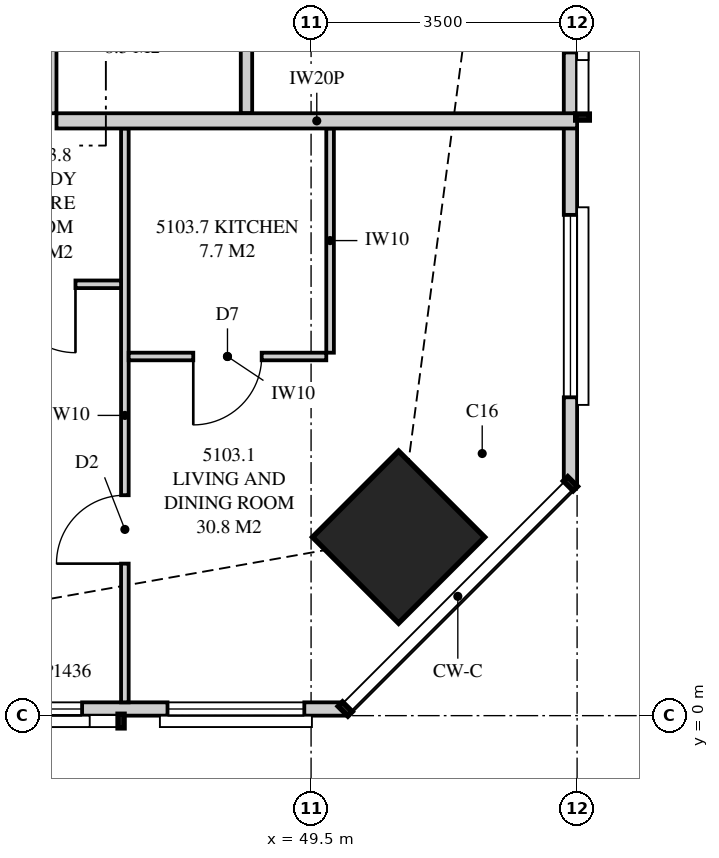
"""IFC4 building model, lengths in metres.
Left out: names, types, materials, properties, quantities, classifications, styles, units other than length and angle.
Written with IfcOpenShell. Run it as: python <this file> out.ifc"""

import sys

from ifc_helpers import new_model, si_unit, direction, frame, frame_2d, origin, origin_2d, place, context, subcontext, project, spatial, polyline, rectangle, outline, extrude, element, fill, save


model = new_model("IFC4")
c1 = context("Model", 3, precision=1e-05, world=origin(), true_north=direction((0.0, 1.0)))
c2 = subcontext(c1, "Body", "Model", "MODEL_VIEW")
j1 = project(units=[si_unit("LENGTHUNIT", "METRE"), si_unit("PLANEANGLEUNIT", "RADIAN")], contexts=[c1])
p1 = place(None, origin())
s1 = spatial("IfcSite", under=j1, at=p1, CompositionType="ELEMENT")
p2 = place(p1, origin())
s2 = spatial("IfcBuilding", under=s1, at=p2, CompositionType="ELEMENT")
p3 = place(p2, frame((0.0, 0.0, 187.85)))
s3 = spatial("IfcBuildingStorey", under=s2, at=p3, CompositionType="ELEMENT", Elevation=187.85)
p4 = place(p3, frame((50.652, 2.348, 0.0), z_axis=(0.0, 0.0, 1.0), x_axis=(0.707106781187, 0.707106781187, 0.0)))
e1 = element("IfcColumn", 1, at=p4, inside=s3, PredefinedType="COLUMN", context=c2, shape_type="SweptSolid", body=[
    extrude(rectangle(XDim=1.6, YDim=1.6, at=origin_2d()), origin(), (0.0, 0.0, 1.0), 3.35),
])
p5 = place(p3, frame((15.051, 0.087, 0.0), z_axis=(0.0, 0.0, 1.0), x_axis=(1.0, 0.0, 0.0)))
e2 = element("IfcWall", 2, at=p5, inside=s3, PredefinedType="SOLIDWALL", context=c2, shape_type="SweptSolid", body=[
    extrude(outline(polyline([(0.0, 0.0), (34.897, 0.0), (34.897, 3.11), (27.91, 3.11), (27.91, 2.15), (27.836, 2.15), (27.836, 3.11), (27.699, 3.11), (27.699, 2.15), (7.199, 2.15), (7.199, 3.11), (7.062, 3.11), (7.062, 2.15), (6.987, 2.15), (6.987, 3.11), (0.0, 3.11), (0.0, 0.0)])), frame((0.0, 0.087, 0.0), z_axis=(0.0, -1.0, 0.0), x_axis=(1.0, 0.0, 0.0)), (0.0, 0.0, 1.0), 0.175),
])
p6 = place(p5, frame((2.84, 0.0, 0.4)))
e3 = element("IfcOpeningElement", 3, at=p6, cuts=e2, PredefinedType="OPENING", context=c2, shape_type="SweptSolid", body=[
    extrude(rectangle(XDim=2.4, YDim=1.7, at=frame_2d((1.2, 0.85))), frame((0.0, 0.097, 0.0), z_axis=(0.0, -1.0, 0.0), x_axis=(1.0, 0.0, 0.0)), (0.0, 0.0, 1.0), 0.195),
])
p7 = place(p5, frame((9.149, 0.0, 0.4)))
e4 = element("IfcOpeningElement", 4, at=p7, cuts=e2, PredefinedType="OPENING", context=c2, shape_type="SweptSolid", body=[
    extrude(rectangle(XDim=1.8, YDim=1.7, at=frame_2d((0.9, 0.85))), frame((0.0, 0.097, 0.0), z_axis=(0.0, -1.0, 0.0), x_axis=(1.0, 0.0, 0.0)), (0.0, 0.0, 1.0), 0.195),
])
p8 = place(p5, frame((13.561, 0.0, 0.0)))
e5 = element("IfcOpeningElement", 5, at=p8, cuts=e2, PredefinedType="OPENING", context=c2, shape_type="SweptSolid", body=[
    extrude(rectangle(XDim=1.8, YDim=2.1, at=frame_2d((0.9, 1.05))), frame((0.0, 0.097, 0.0), z_axis=(0.0, -1.0, 0.0), x_axis=(1.0, 0.0, 0.0)), (0.0, 0.0, 1.0), 0.195),
])
p9 = place(p5, frame((19.849, 0.0, 0.4)))
e6 = element("IfcOpeningElement", 6, at=p9, cuts=e2, PredefinedType="OPENING", context=c2, shape_type="SweptSolid", body=[
    extrude(rectangle(XDim=1.8, YDim=1.7, at=frame_2d((0.9, 0.85))), frame((0.0, 0.097, 0.0), z_axis=(0.0, -1.0, 0.0), x_axis=(1.0, 0.0, 0.0)), (0.0, 0.0, 1.0), 0.195),
])
p10 = place(p5, frame((23.449, 0.0, 0.4)))
e7 = element("IfcOpeningElement", 7, at=p10, cuts=e2, PredefinedType="OPENING", context=c2, shape_type="SweptSolid", body=[
    extrude(rectangle(XDim=1.8, YDim=1.7, at=frame_2d((0.9, 0.85))), frame((0.0, 0.097, 0.0), z_axis=(0.0, -1.0, 0.0), x_axis=(1.0, 0.0, 0.0)), (0.0, 0.0, 1.0), 0.195),
])
p11 = place(p5, frame((29.636, 0.0, 0.4)))
e8 = element("IfcOpeningElement", 8, at=p11, cuts=e2, PredefinedType="OPENING", context=c2, shape_type="SweptSolid", body=[
    extrude(rectangle(XDim=1.8, YDim=1.7, at=frame_2d((0.9, 0.85))), frame((0.0, 0.097, 0.0), z_axis=(0.0, -1.0, 0.0), x_axis=(1.0, 0.0, 0.0)), (0.0, 0.0, 1.0), 0.195),
])
p12 = place(p5, frame((32.56, 0.0, 0.4)))
e9 = element("IfcOpeningElement", 9, at=p12, cuts=e2, PredefinedType="OPENING", context=c2, shape_type="SweptSolid", body=[
    extrude(rectangle(XDim=1.8, YDim=1.7, at=frame_2d((0.9, 0.85))), frame((0.0, 0.097, 0.0), z_axis=(0.0, -1.0, 0.0), x_axis=(1.0, 0.0, 0.0)), (0.0, 0.0, 1.0), 0.195),
])
p13 = place(p3, frame((52.913, 3.051, 0.0), z_axis=(0.0, 0.0, 1.0), x_axis=(0.0, 1.0, 0.0)))
e10 = element("IfcWall", 10, at=p13, inside=s3, PredefinedType="SOLIDWALL", context=c2, shape_type="SweptSolid", body=[
    extrude(outline(polyline([(0.0, 0.0), (29.897, 0.0), (29.897, 3.11), (22.167, 3.11), (22.167, 2.15), (22.074, 2.15), (22.074, 3.11), (21.949, 3.11), (21.949, 2.15), (9.949, 2.15), (9.949, 3.11), (9.847, 3.11), (9.847, 2.15), (9.706, 2.15), (9.706, 3.11), (0.0, 3.11), (0.0, 0.0)])), frame((0.0, 0.087, 0.0), z_axis=(0.0, -1.0, 0.0), x_axis=(1.0, 0.0, 0.0)), (0.0, 0.0, 1.0), 0.175),
])
p14 = place(p13, frame((1.137, 0.0, 0.4)))
e11 = element("IfcOpeningElement", 11, at=p14, cuts=e10, PredefinedType="OPENING", context=c2, shape_type="SweptSolid", body=[
    extrude(rectangle(XDim=2.4, YDim=1.7, at=frame_2d((1.2, 0.85))), frame((0.0, 0.097, 0.0), z_axis=(0.0, -1.0, 0.0), x_axis=(1.0, 0.0, 0.0)), (0.0, 0.0, 1.0), 0.195),
])
p15 = place(p13, frame((5.674, 0.0, 0.4)))
e12 = element("IfcOpeningElement", 12, at=p15, cuts=e10, PredefinedType="OPENING", context=c2, shape_type="SweptSolid", body=[
    extrude(rectangle(XDim=1.8, YDim=1.7, at=frame_2d((0.9, 0.85))), frame((0.0, 0.097, 0.0), z_axis=(0.0, -1.0, 0.0), x_axis=(1.0, 0.0, 0.0)), (0.0, 0.0, 1.0), 0.195),
])
p16 = place(p13, frame((11.902, 0.0, 0.4)))
e13 = element("IfcOpeningElement", 13, at=p16, cuts=e10, PredefinedType="OPENING", context=c2, shape_type="SweptSolid", body=[
    extrude(rectangle(XDim=2.4, YDim=1.7, at=frame_2d((1.2, 0.85))), frame((0.0, 0.097, 0.0), z_axis=(0.0, -1.0, 0.0), x_axis=(1.0, 0.0, 0.0)), (0.0, 0.0, 1.0), 0.195),
])
p17 = place(p13, frame((15.324, 0.0, 0.0)))
e14 = element("IfcOpeningElement", 14, at=p17, cuts=e10, PredefinedType="OPENING", context=c2, shape_type="SweptSolid", body=[
    extrude(rectangle(XDim=1.8, YDim=2.1, at=frame_2d((0.9, 1.05))), frame((0.0, 0.097, 0.0), z_axis=(0.0, -1.0, 0.0), x_axis=(1.0, 0.0, 0.0)), (0.0, 0.0, 1.0), 0.195),
])
p18 = place(p13, frame((23.874, 0.0, 0.4)))
e15 = element("IfcOpeningElement", 15, at=p18, cuts=e10, PredefinedType="OPENING", context=c2, shape_type="SweptSolid", body=[
    extrude(rectangle(XDim=1.8, YDim=1.7, at=frame_2d((0.9, 0.85))), frame((0.0, 0.097, 0.0), z_axis=(0.0, -1.0, 0.0), x_axis=(1.0, 0.0, 0.0)), (0.0, 0.0, 1.0), 0.195),
])
p19 = place(p13, frame((26.871, 0.0, 0.4)))
e16 = element("IfcOpeningElement", 16, at=p19, cuts=e10, PredefinedType="OPENING", context=c2, shape_type="SweptSolid", body=[
    extrude(rectangle(XDim=1.8, YDim=1.7, at=frame_2d((0.9, 0.85))), frame((0.0, 0.097, 0.0), z_axis=(0.0, -1.0, 0.0), x_axis=(1.0, 0.0, 0.0)), (0.0, 0.0, 1.0), 0.195),
])
p20 = place(p3, frame((47.05, 0.175, 0.0), z_axis=(0.0, 0.0, 1.0), x_axis=(0.0, 1.0, 0.0)))
e17 = element("IfcWall", 17, at=p20, inside=s3, PredefinedType="PARTITIONING", context=c2, shape_type="SweptSolid", body=[
    extrude(outline(polyline([(0.0, 0.0), (7.55, 0.0), (7.55, 3.11), (2.409, 3.11), (2.409, 2.15), (0.663, 2.15), (0.663, 3.11), (0.0, 3.11), (0.0, 0.0)])), frame((0.0, 0.05, 0.0), z_axis=(0.0, -1.0, 0.0), x_axis=(1.0, 0.0, 0.0)), (0.0, 0.0, 1.0), 0.1),
])
p21 = place(p20, frame((1.825, 0.0, 0.0)))
e18 = element("IfcOpeningElement", 18, at=p21, cuts=e17, PredefinedType="OPENING", context=c2, shape_type="SweptSolid", body=[
    extrude(rectangle(XDim=0.9, YDim=2.1, at=frame_2d((0.45, 1.05))), frame((0.0, 0.06, 0.0), z_axis=(0.0, -1.0, 0.0), x_axis=(1.0, 0.0, 0.0)), (0.0, 0.0, 1.0), 0.12),
])
p22 = place(p3, frame((47.1, 4.725, 0.0), z_axis=(0.0, 0.0, 1.0), x_axis=(1.0, 0.0, 0.0)))
e19 = element("IfcWall", 19, at=p22, inside=s3, PredefinedType="PARTITIONING", context=c2, shape_type="SweptSolid", body=[
    extrude(rectangle(XDim=2.6, YDim=0.1, at=frame_2d((1.3, 0.0))), origin(), (0.0, 0.0, 1.0), 3.11),
])
p23 = place(p22, frame((0.85, 0.0, 0.0)))
e20 = element("IfcOpeningElement", 20, at=p23, cuts=e19, PredefinedType="OPENING", context=c2, shape_type="SweptSolid", body=[
    extrude(rectangle(XDim=0.9, YDim=2.1, at=frame_2d((0.45, 1.05))), frame((0.0, 0.06, 0.0), z_axis=(0.0, -1.0, 0.0), x_axis=(1.0, 0.0, 0.0)), (0.0, 0.0, 1.0), 0.12),
])
p24 = place(p3, frame((49.75, 4.775, 0.0), z_axis=(0.0, 0.0, 1.0), x_axis=(0.0, 1.0, 0.0)))
e21 = element("IfcWall", 21, at=p24, inside=s3, PredefinedType="PARTITIONING", context=c2, shape_type="SweptSolid", body=[
    extrude(rectangle(XDim=2.95, YDim=0.1, at=frame_2d((1.475, 0.0))), origin(), (0.0, 0.0, 1.0), 3.11),
])
p25 = place(p3, frame((46.15, 7.825, 0.0), z_axis=(0.0, 0.0, 1.0), x_axis=(1.0, 0.0, 0.0)))
e22 = element("IfcWall", 22, at=p25, inside=s3, PredefinedType="PARTITIONING", context=c2, shape_type="SweptSolid", body=[
    extrude(outline(polyline([(0.0, 0.0), (6.85, 0.0), (6.85, 3.11), (6.138, 3.11), (6.138, 2.15), (4.303, 2.15), (4.303, 3.11), (0.0, 3.11), (0.0, 0.0)])), frame((0.0, 0.1, 0.0), z_axis=(0.0, -1.0, 0.0), x_axis=(1.0, 0.0, 0.0)), (0.0, 0.0, 1.0), 0.2),
])
p26 = place(p3, frame((46.05, 7.925, 0.0), z_axis=(0.0, 0.0, 1.0), x_axis=(0.0, 1.0, 0.0)))
e23 = element("IfcWall", 23, at=p26, inside=s3, PredefinedType="PARTITIONING", context=c2, shape_type="SweptSolid", body=[
    extrude(outline(polyline([(0.0, 0.0), (13.775, 0.0), (13.775, 3.11), (5.412, 3.11), (5.412, 2.541), (4.738, 2.541), (4.738, 3.11), (0.0, 3.11), (0.0, 0.0)])), frame((0.0, 0.1, 0.0), z_axis=(0.0, -1.0, 0.0), x_axis=(1.0, 0.0, 0.0)), (0.0, 0.0, 1.0), 0.2),
])
p27 = place(p26, frame((6.387, 0.0, 0.0)))
e24 = element("IfcOpeningElement", 24, at=p27, cuts=e23, PredefinedType="OPENING", context=c2, shape_type="SweptSolid", body=[
    extrude(rectangle(XDim=1.05, YDim=2.2, at=frame_2d((0.525, 1.1))), frame((0.0, 0.11, 0.0), z_axis=(0.0, -1.0, 0.0), x_axis=(1.0, 0.0, 0.0)), (0.0, 0.0, 1.0), 0.22),
])
p28 = place(p3, frame((48.65, 7.925, 0.0), z_axis=(0.0, 0.0, 1.0), x_axis=(0.0, 1.0, 0.0)))
e25 = element("IfcWall", 25, at=p28, inside=s3, PredefinedType="PLUMBINGWALL", context=c2, shape_type="SweptSolid", body=[
    extrude(rectangle(XDim=3.45, YDim=0.15, at=frame_2d((1.725, 0.0))), origin(), (0.0, 0.0, 1.0), 3.11),
])
p29 = place(p28, frame((2.15, 0.0, 0.0)))
e26 = element("IfcOpeningElement", 26, at=p29, cuts=e25, PredefinedType="OPENING", context=c2, shape_type="SweptSolid", body=[
    extrude(rectangle(XDim=0.9, YDim=2.1, at=frame_2d((0.45, 1.05))), frame((0.0, 0.085, 0.0), z_axis=(0.0, -1.0, 0.0), x_axis=(1.0, 0.0, 0.0)), (0.0, 0.0, 1.0), 0.17),
])
p30 = place(p3, frame((47.0, 5.675, 0.0), z_axis=(0.0, 0.0, 1.0), x_axis=(-1.0, 0.0, 0.0)))
e27 = element("IfcWall", 27, at=p30, inside=s3, PredefinedType="PARTITIONING", context=c2, shape_type="SweptSolid", body=[
    extrude(rectangle(XDim=2.1, YDim=0.1, at=frame_2d((1.05, 0.0))), origin(), (0.0, 0.0, 1.0), 3.11),
])
p31 = place(p30, frame((0.6, 0.0, 0.0)))
e28 = element("IfcOpeningElement", 28, at=p31, cuts=e27, PredefinedType="OPENING", context=c2, shape_type="SweptSolid", body=[
    extrude(rectangle(XDim=0.9, YDim=2.1, at=frame_2d((0.45, 1.05))), frame((0.0, 0.06, 0.0), z_axis=(0.0, -1.0, 0.0), x_axis=(1.0, 0.0, 0.0)), (0.0, 0.0, 1.0), 0.12),
])
p32 = place(p11, origin())
e29 = element("IfcWindow", 29, at=p32, inside=s3, PartitioningType="SINGLE_PANEL", PredefinedType="WINDOW", context=c2, shape_type="SweptSolid", body=[
    extrude(rectangle(XDim=1.8, YDim=1.7, at=frame_2d((0.9, 0.85))), frame((0.0, 0.03, 0.0), z_axis=(0.0, -1.0, 0.0), x_axis=(1.0, 0.0, 0.0)), (0.0, 0.0, 1.0), 0.06),
])
fill(e8, e29)
p33 = place(p12, origin())
e30 = element("IfcWindow", 30, at=p33, inside=s3, PartitioningType="SINGLE_PANEL", PredefinedType="WINDOW", context=c2, shape_type="SweptSolid", body=[
    extrude(rectangle(XDim=1.8, YDim=1.7, at=frame_2d((0.9, 0.85))), frame((0.0, 0.03, 0.0), z_axis=(0.0, -1.0, 0.0), x_axis=(1.0, 0.0, 0.0)), (0.0, 0.0, 1.0), 0.06),
])
fill(e9, e30)
p34 = place(p14, origin())
e31 = element("IfcWindow", 31, at=p34, inside=s3, PartitioningType="SINGLE_PANEL", PredefinedType="WINDOW", context=c2, shape_type="SweptSolid", body=[
    extrude(rectangle(XDim=2.4, YDim=1.7, at=frame_2d((1.2, 0.85))), frame((0.0, 0.03, 0.0), z_axis=(0.0, -1.0, 0.0), x_axis=(1.0, 0.0, 0.0)), (0.0, 0.0, 1.0), 0.06),
])
fill(e11, e31)
p35 = place(p15, origin())
e32 = element("IfcWindow", 32, at=p35, inside=s3, PartitioningType="SINGLE_PANEL", PredefinedType="WINDOW", context=c2, shape_type="SweptSolid", body=[
    extrude(rectangle(XDim=1.8, YDim=1.7, at=frame_2d((0.9, 0.85))), frame((0.0, 0.03, 0.0), z_axis=(0.0, -1.0, 0.0), x_axis=(1.0, 0.0, 0.0)), (0.0, 0.0, 1.0), 0.06),
])
fill(e12, e32)
p36 = place(p21, origin())
e33 = element("IfcDoor", 33, at=p36, inside=s3, OperationType="SINGLE_SWING_LEFT", PredefinedType="DOOR", context=c2, shape_type="SweptSolid", body=[
    extrude(rectangle(XDim=0.9, YDim=2.1, at=frame_2d((0.45, 1.05))), frame((0.0, 0.025, 0.0), z_axis=(0.0, -1.0, 0.0), x_axis=(1.0, 0.0, 0.0)), (0.0, 0.0, 1.0), 0.05),
])
fill(e18, e33)
p37 = place(p23, frame((0.9, 0.0, 0.0), z_axis=(0.0, 0.0, 1.0), x_axis=(-1.0, 0.0, 0.0)))
e34 = element("IfcDoor", 34, at=p37, inside=s3, OperationType="SINGLE_SWING_RIGHT", PredefinedType="DOOR", context=c2, shape_type="SweptSolid", body=[
    extrude(rectangle(XDim=0.9, YDim=2.1, at=frame_2d((0.45, 1.05))), frame((0.0, 0.025, 0.0), z_axis=(0.0, -1.0, 0.0), x_axis=(1.0, 0.0, 0.0)), (0.0, 0.0, 1.0), 0.05),
])
fill(e20, e34)
p38 = place(p31, origin())
e35 = element("IfcDoor", 35, at=p38, inside=s3, OperationType="SINGLE_SWING_LEFT", PredefinedType="DOOR", context=c2, shape_type="SweptSolid", body=[
    extrude(rectangle(XDim=0.9, YDim=2.1, at=frame_2d((0.45, 1.05))), frame((0.0, 0.025, 0.0), z_axis=(0.0, -1.0, 0.0), x_axis=(1.0, 0.0, 0.0)), (0.0, 0.0, 1.0), 0.05),
])
fill(e28, e35)
save(model, sys.argv[1])
